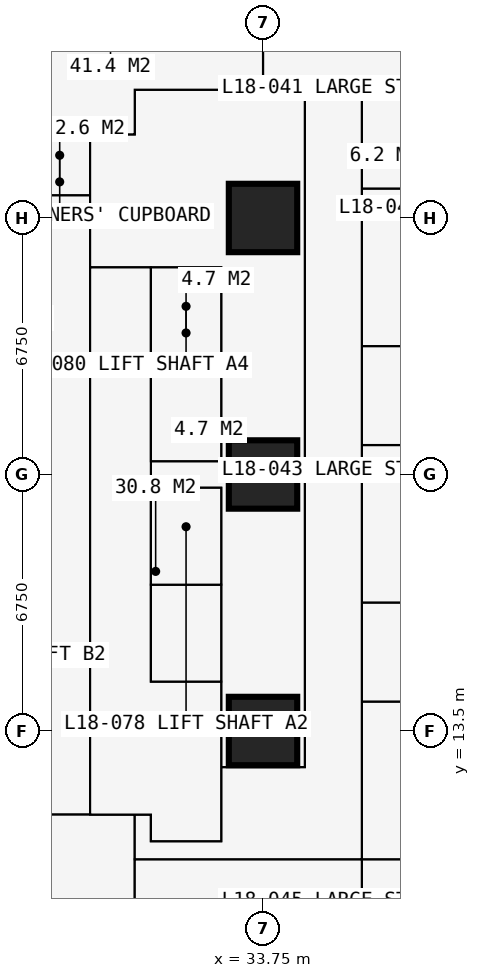
"""IFC4 building model, lengths in metres.
Left out: names, types, materials, properties, quantities, classifications, styles, units other than length and angle.
Written with IfcOpenShell. Run it as: python <this file> out.ifc"""

import sys

from ifc_helpers import new_model, si_unit, direction, frame, frame_2d, origin, origin_2d, place, context, subcontext, project, spatial, rectangle, extrude, element, fill, save


model = new_model("IFC4")
c1 = context("Model", 3, precision=1e-05, world=origin(), true_north=direction((0.0, 1.0)))
c2 = subcontext(c1, "Body", "Model", "MODEL_VIEW")
j1 = project(units=[si_unit("LENGTHUNIT", "METRE"), si_unit("PLANEANGLEUNIT", "RADIAN")], contexts=[c1])
p1 = place(None, origin())
s1 = spatial("IfcSite", under=j1, at=p1, CompositionType="ELEMENT")
p2 = place(p1, origin())
s2 = spatial("IfcBuilding", under=s1, at=p2, CompositionType="ELEMENT")
p3 = place(p2, frame((0.0, 0.0, 68.4)))
s3 = spatial("IfcBuildingStorey", under=s2, at=p3, CompositionType="ELEMENT", Elevation=68.4)
for number, where, z_axis, x_axis in (
    (1, (33.75, 13.5, 0.0), (0.0, 0.0, 1.0), (1.0, 0.0, 0.0)),
    (2, (33.75, 20.25, 0.0), (0.0, 0.0, 1.0), (1.0, 0.0, 0.0)),
    (3, (33.75, 27.0, 0.0), (0.0, 0.0, 1.0), (1.0, 0.0, 0.0)),
):
    element("IfcColumn", number, at=place(p3, frame(where, z_axis=z_axis, x_axis=x_axis)), inside=s3, PredefinedType="COLUMN", context=c2, shape_type="SweptSolid", body=[
        extrude(rectangle(XDim=1.8, YDim=1.8, at=origin_2d()), origin(), (0.0, 0.0, 1.0), 3.6),
    ])
p4 = place(p3, frame((10.125, 11.3, 0.0), z_axis=(0.0, 0.0, 1.0), x_axis=(1.0, 0.0, 0.0)))
e4 = element("IfcWall", 4, at=p4, inside=s3, PredefinedType="PARTITIONING", context=c2, shape_type="SweptSolid", body=[
    extrude(rectangle(XDim=20.675, YDim=0.15, at=frame_2d((10.337, 0.0))), origin(), (0.0, 0.0, 1.0), 3.375),
])
p5 = place(p4, frame((8.375, 0.0, 0.0)))
e5 = element("IfcOpeningElement", 5, at=p5, cuts=e4, PredefinedType="OPENING", context=c2, shape_type="SweptSolid", body=[
    extrude(rectangle(XDim=1.0, YDim=2.2, at=frame_2d((0.5, 1.1))), frame((0.0, 0.085, 0.0), z_axis=(0.0, -1.0, 0.0), x_axis=(1.0, 0.0, 0.0)), (0.0, 0.0, 1.0), 0.17),
])
p6 = place(p4, frame((10.975, 0.0, 0.0)))
e6 = element("IfcOpeningElement", 6, at=p6, cuts=e4, PredefinedType="OPENING", context=c2, shape_type="SweptSolid", body=[
    extrude(rectangle(XDim=1.0, YDim=2.2, at=frame_2d((0.5, 1.1))), frame((0.0, 0.085, 0.0), z_axis=(0.0, -1.0, 0.0), x_axis=(1.0, 0.0, 0.0)), (0.0, 0.0, 1.0), 0.17),
])
p7 = place(p4, frame((3.925, 0.0, 0.0)))
e7 = element("IfcOpeningElement", 7, at=p7, cuts=e4, PredefinedType="OPENING", context=c2, shape_type="SweptSolid", body=[
    extrude(rectangle(XDim=0.95, YDim=2.2, at=frame_2d((0.475, 1.1))), frame((0.0, 0.085, 0.0), z_axis=(0.0, -1.0, 0.0), x_axis=(1.0, 0.0, 0.0)), (0.0, 0.0, 1.0), 0.17),
])
p8 = place(p3, frame((11.3, 29.2, 0.0), z_axis=(0.0, 0.0, 1.0), x_axis=(1.0, 0.0, 0.0)))
e8 = element("IfcWall", 8, at=p8, inside=s3, PredefinedType="PARTITIONING", context=c2, shape_type="SweptSolid", body=[
    extrude(rectangle(XDim=19.075, YDim=0.15, at=frame_2d((9.538, 0.0))), origin(), (0.0, 0.0, 1.0), 3.375),
])
p9 = place(p8, frame((12.875, 0.0, 0.0)))
e9 = element("IfcOpeningElement", 9, at=p9, cuts=e8, PredefinedType="OPENING", context=c2, shape_type="SweptSolid", body=[
    extrude(rectangle(XDim=1.0, YDim=2.2, at=frame_2d((0.5, 1.1))), frame((0.0, 0.085, 0.0), z_axis=(0.0, -1.0, 0.0), x_axis=(1.0, 0.0, 0.0)), (0.0, 0.0, 1.0), 0.17),
])
p10 = place(p8, frame((10.438, 0.0, 0.0)))
e10 = element("IfcOpeningElement", 10, at=p10, cuts=e8, PredefinedType="OPENING", context=c2, shape_type="SweptSolid", body=[
    extrude(rectangle(XDim=1.0, YDim=2.2, at=frame_2d((0.5, 1.1))), frame((0.0, 0.085, 0.0), z_axis=(0.0, -1.0, 0.0), x_axis=(1.0, 0.0, 0.0)), (0.0, 0.0, 1.0), 0.17),
])
p11 = place(p8, frame((14.875, 0.0, 0.0)))
e11 = element("IfcOpeningElement", 11, at=p11, cuts=e8, PredefinedType="OPENING", context=c2, shape_type="SweptSolid", body=[
    extrude(rectangle(XDim=0.95, YDim=2.2, at=frame_2d((0.475, 1.1))), frame((0.0, 0.085, 0.0), z_axis=(0.0, -1.0, 0.0), x_axis=(1.0, 0.0, 0.0)), (0.0, 0.0, 1.0), 0.17),
])
p12 = place(p3, frame((27.6, 27.6, 0.0), z_axis=(0.0, 0.0, 1.0), x_axis=(1.0, 0.0, 0.0)))
e12 = element("IfcWall", 12, at=p12, inside=s3, PredefinedType="PARTITIONING", context=c2, shape_type="SweptSolid", body=[
    extrude(rectangle(XDim=1.6, YDim=0.15, at=frame_2d((0.8, 0.0))), origin(), (0.0, 0.0, 1.0), 2.877),
])
p13 = place(p3, frame((29.2, 11.3, 0.0), z_axis=(0.0, 0.0, 1.0), x_axis=(0.0, 1.0, 0.0)))
e13 = element("IfcWall", 13, at=p13, inside=s3, PredefinedType="PARTITIONING", context=c2, shape_type="SweptSolid", body=[
    extrude(rectangle(XDim=17.9, YDim=0.2, at=frame_2d((8.95, 0.0))), origin(), (0.0, 0.0, 1.0), 3.375),
])
p14 = place(p13, frame((8.35, 0.0, 0.0)))
e14 = element("IfcOpeningElement", 14, at=p14, cuts=e13, PredefinedType="OPENING", context=c2, shape_type="SweptSolid", body=[
    extrude(rectangle(XDim=1.2, YDim=2.2, at=frame_2d((0.6, 1.1))), frame((0.0, 0.11, 0.0), z_axis=(0.0, -1.0, 0.0), x_axis=(1.0, 0.0, 0.0)), (0.0, 0.0, 1.0), 0.22),
])
p15 = place(p3, frame((29.2, 25.7, 0.0), z_axis=(0.0, 0.0, 1.0), x_axis=(1.0, 0.0, 0.0)))
e15 = element("IfcWall", 15, at=p15, inside=s3, PredefinedType="SHEAR", context=c2, shape_type="SweptSolid", body=[
    extrude(rectangle(XDim=3.45, YDim=0.1, at=frame_2d((1.725, 0.0))), origin(), (0.0, 0.0, 1.0), 3.375),
])
p16 = place(p3, frame((30.375, -0.734, 0.0), z_axis=(0.0, 0.0, 1.0), x_axis=(0.0, 1.0, 0.0)))
e16 = element("IfcWall", 16, at=p16, inside=s3, PredefinedType="PARTITIONING", context=c2, shape_type="SweptSolid", body=[
    extrude(rectangle(XDim=12.034, YDim=0.15, at=frame_2d((6.017, 0.0))), origin(), (0.0, 0.0, 1.0), 3.375),
])
p17 = place(p3, frame((30.375, 10.125, 0.0), z_axis=(0.0, 0.0, 1.0), x_axis=(1.0, 0.0, 0.0)))
e17 = element("IfcWall", 17, at=p17, inside=s3, PredefinedType="PARTITIONING", context=c2, shape_type="SweptSolid", body=[
    extrude(rectangle(XDim=10.859, YDim=0.15, at=frame_2d((5.429, 0.0))), origin(), (0.0, 0.0, 1.0), 3.375),
])
p18 = place(p17, frame((2.5, 0.0, 0.0)))
e18 = element("IfcOpeningElement", 18, at=p18, cuts=e17, PredefinedType="OPENING", context=c2, shape_type="SweptSolid", body=[
    extrude(rectangle(XDim=1.0, YDim=2.2, at=frame_2d((0.5, 1.1))), frame((0.0, 0.085, 0.0), z_axis=(0.0, -1.0, 0.0), x_axis=(1.0, 0.0, 0.0)), (0.0, 0.0, 1.0), 0.17),
])
p19 = place(p3, frame((30.375, 29.2, 0.0), z_axis=(0.0, 0.0, 1.0), x_axis=(0.0, 1.0, 0.0)))
e19 = element("IfcWall", 19, at=p19, inside=s3, PredefinedType="PARTITIONING", context=c2, shape_type="SweptSolid", body=[
    extrude(rectangle(XDim=1.175, YDim=0.15, at=frame_2d((0.587, 0.0))), origin(), (0.0, 0.0, 1.0), 3.375),
])
p20 = place(p3, frame((30.375, 30.375, 0.0), z_axis=(0.0, 0.0, 1.0), x_axis=(1.0, 0.0, 0.0)))
e20 = element("IfcWall", 20, at=p20, inside=s3, PredefinedType="PARTITIONING", context=c2, shape_type="SweptSolid", body=[
    extrude(rectangle(XDim=10.859, YDim=0.15, at=frame_2d((5.429, 0.0))), origin(), (0.0, 0.0, 1.0), 3.375),
])
p21 = place(p3, frame((30.8, 10.6, 0.0), z_axis=(0.0, 0.0, 1.0), x_axis=(0.0, 1.0, 0.0)))
e21 = element("IfcWall", 21, at=p21, inside=s3, PredefinedType="PARTITIONING", context=c2, shape_type="SweptSolid", body=[
    extrude(rectangle(XDim=0.7, YDim=0.15, at=frame_2d((0.35, 0.0))), origin(), (0.0, 0.0, 1.0), 3.375),
])
p22 = place(p3, frame((30.8, 10.6, 0.0), z_axis=(0.0, 0.0, 1.0), x_axis=(1.0, 0.0, 0.0)))
e22 = element("IfcWall", 22, at=p22, inside=s3, PredefinedType="PARTITIONING", context=c2, shape_type="SweptSolid", body=[
    extrude(rectangle(XDim=1.85, YDim=0.15, at=frame_2d((0.925, 0.0))), origin(), (0.0, 0.0, 1.0), 3.375),
])
p23 = place(p3, frame((30.8, 14.8, 0.0), z_axis=(0.0, 0.0, 1.0), x_axis=(0.0, 1.0, 0.0)))
e23 = element("IfcWall", 23, at=p23, inside=s3, PredefinedType="PARTITIONING", context=c2, shape_type="SweptSolid", body=[
    extrude(rectangle(XDim=10.9, YDim=0.15, at=frame_2d((5.45, 0.0))), origin(), (0.0, 0.0, 1.0), 3.375),
])
p24 = place(p23, frame((0.75, 0.0, 0.0)))
e24 = element("IfcOpeningElement", 24, at=p24, cuts=e23, PredefinedType="OPENING", context=c2, shape_type="SweptSolid", body=[
    extrude(rectangle(XDim=1.1, YDim=2.2, at=frame_2d((0.55, 1.1))), frame((0.0, 0.085, 0.0), z_axis=(0.0, -1.0, 0.0), x_axis=(1.0, 0.0, 0.0)), (0.0, 0.0, 1.0), 0.17),
])
p25 = place(p23, frame((3.25, 0.0, 0.0)))
e25 = element("IfcOpeningElement", 25, at=p25, cuts=e23, PredefinedType="OPENING", context=c2, shape_type="SweptSolid", body=[
    extrude(rectangle(XDim=1.1, YDim=2.2, at=frame_2d((0.55, 1.1))), frame((0.0, 0.085, 0.0), z_axis=(0.0, -1.0, 0.0), x_axis=(1.0, 0.0, 0.0)), (0.0, 0.0, 1.0), 0.17),
])
p26 = place(p23, frame((6.5, 0.0, 0.0)))
e26 = element("IfcOpeningElement", 26, at=p26, cuts=e23, PredefinedType="OPENING", context=c2, shape_type="SweptSolid", body=[
    extrude(rectangle(XDim=1.1, YDim=2.2, at=frame_2d((0.55, 1.1))), frame((0.0, 0.085, 0.0), z_axis=(0.0, -1.0, 0.0), x_axis=(1.0, 0.0, 0.0)), (0.0, 0.0, 1.0), 0.17),
])
p27 = place(p23, frame((9.05, 0.0, 0.0)))
e27 = element("IfcOpeningElement", 27, at=p27, cuts=e23, PredefinedType="OPENING", context=c2, shape_type="SweptSolid", body=[
    extrude(rectangle(XDim=1.1, YDim=2.2, at=frame_2d((0.55, 1.1))), frame((0.0, 0.085, 0.0), z_axis=(0.0, -1.0, 0.0), x_axis=(1.0, 0.0, 0.0)), (0.0, 0.0, 1.0), 0.17),
])
for number, where, z_axis, x_axis in (
    (28, (30.8, 14.8, 0.0), (0.0, 0.0, 1.0), (1.0, 0.0, 0.0)),
    (29, (30.8, 17.35, 0.0), (0.0, 0.0, 1.0), (1.0, 0.0, 0.0)),
    (30, (30.8, 19.9, 0.0), (0.0, 0.0, 1.0), (1.0, 0.0, 0.0)),
    (31, (30.8, 20.6, 0.0), (0.0, 0.0, 1.0), (1.0, 0.0, 0.0)),
    (32, (30.8, 23.15, 0.0), (0.0, 0.0, 1.0), (1.0, 0.0, 0.0)),
):
    element("IfcWall", number, at=place(p3, frame(where, z_axis=z_axis, x_axis=x_axis)), inside=s3, PredefinedType="SHEAR", context=c2, shape_type="SweptSolid", body=[
        extrude(rectangle(XDim=1.85, YDim=0.1, at=frame_2d((0.925, 0.0))), origin(), (0.0, 0.0, 1.0), 3.375),
    ])
p28 = place(p3, frame((32.65, 10.6, 0.0), z_axis=(0.0, 0.0, 1.0), x_axis=(0.0, 1.0, 0.0)))
e33 = element("IfcWall", 33, at=p28, inside=s3, PredefinedType="SHEAR", context=c2, shape_type="SweptSolid", body=[
    extrude(rectangle(XDim=9.3, YDim=0.1, at=frame_2d((4.65, 0.0))), origin(), (0.0, 0.0, 1.0), 3.375),
])
p29 = place(p28, frame((0.5, 0.0, 0.0)))
e34 = element("IfcOpeningElement", 34, at=p29, cuts=e33, PredefinedType="OPENING", context=c2, shape_type="SweptSolid", body=[
    extrude(rectangle(XDim=1.0, YDim=2.2, at=frame_2d((0.5, 1.1))), frame((0.0, 0.06, 0.0), z_axis=(0.0, -1.0, 0.0), x_axis=(1.0, 0.0, 0.0)), (0.0, 0.0, 1.0), 0.12),
])
p30 = place(p3, frame((32.65, 12.55, 0.0), z_axis=(0.0, 0.0, 1.0), x_axis=(1.0, 0.0, 0.0)))
e35 = element("IfcWall", 35, at=p30, inside=s3, PredefinedType="PARTITIONING", context=c2, shape_type="SweptSolid", body=[
    extrude(rectangle(XDim=2.2, YDim=0.15, at=frame_2d((1.1, 0.0))), origin(), (0.0, 0.0, 1.0), 3.375),
])
p31 = place(p3, frame((32.65, 20.6, 0.0), z_axis=(0.0, 0.0, 1.0), x_axis=(0.0, 1.0, 0.0)))
e36 = element("IfcWall", 36, at=p31, inside=s3, PredefinedType="PARTITIONING", context=c2, shape_type="SweptSolid", body=[
    extrude(rectangle(XDim=5.1, YDim=0.15, at=frame_2d((2.55, 0.0))), origin(), (0.0, 0.0, 1.0), 3.375),
])
p32 = place(p3, frame((33.75, 30.375, 0.0), z_axis=(0.0, 0.0, 1.0), x_axis=(0.0, 1.0, 0.0)))
e37 = element("IfcWall", 37, at=p32, inside=s3, PredefinedType="PARTITIONING", context=c2, shape_type="SweptSolid", body=[
    extrude(rectangle(XDim=5.975, YDim=0.15, at=frame_2d((2.988, 0.0))), origin(), (0.0, 0.0, 1.0), 2.877),
])
p33 = place(p3, frame((34.85, 12.55, 0.0), z_axis=(0.0, 0.0, 1.0), x_axis=(0.0, 1.0, 0.0)))
e38 = element("IfcWall", 38, at=p33, inside=s3, PredefinedType="PARTITIONING", context=c2, shape_type="SweptSolid", body=[
    extrude(rectangle(XDim=17.825, YDim=0.15, at=frame_2d((8.913, 0.0))), origin(), (0.0, 0.0, 1.0), 3.375),
])
p34 = place(p33, frame((8.6, 0.0, 0.0)))
e39 = element("IfcOpeningElement", 39, at=p34, cuts=e38, PredefinedType="OPENING", context=c2, shape_type="SweptSolid", body=[
    extrude(rectangle(XDim=0.95, YDim=2.2, at=frame_2d((0.475, 1.1))), frame((0.0, 0.085, 0.0), z_axis=(0.0, -1.0, 0.0), x_axis=(1.0, 0.0, 0.0)), (0.0, 0.0, 1.0), 0.17),
])
p35 = place(p3, frame((36.35, 6.75, 0.0), z_axis=(0.0, 0.0, 1.0), x_axis=(0.0, 1.0, 0.0)))
e40 = element("IfcWall", 40, at=p35, inside=s3, PredefinedType="PARTITIONING", context=c2, shape_type="SweptSolid", body=[
    extrude(rectangle(XDim=23.625, YDim=0.15, at=frame_2d((11.812, 0.0))), origin(), (0.0, 0.0, 1.0), 3.375),
])
p36 = place(p35, frame((0.2, 0.0, 0.0)))
e41 = element("IfcOpeningElement", 41, at=p36, cuts=e40, PredefinedType="OPENING", context=c2, shape_type="SweptSolid", body=[
    extrude(rectangle(XDim=0.95, YDim=2.2, at=frame_2d((0.475, 1.1))), frame((0.0, 0.085, 0.0), z_axis=(0.0, -1.0, 0.0), x_axis=(1.0, 0.0, 0.0)), (0.0, 0.0, 1.0), 0.17),
])
p37 = place(p35, frame((18.475, 0.0, 0.0)))
e42 = element("IfcOpeningElement", 42, at=p37, cuts=e40, PredefinedType="OPENING", context=c2, shape_type="SweptSolid", body=[
    extrude(rectangle(XDim=0.95, YDim=2.2, at=frame_2d((0.475, 1.1))), frame((0.0, 0.085, 0.0), z_axis=(0.0, -1.0, 0.0), x_axis=(1.0, 0.0, 0.0)), (0.0, 0.0, 1.0), 0.17),
])
p38 = place(p35, frame((11.725, 0.0, 0.0)))
e43 = element("IfcOpeningElement", 43, at=p38, cuts=e40, PredefinedType="OPENING", context=c2, shape_type="SweptSolid", body=[
    extrude(rectangle(XDim=0.95, YDim=2.2, at=frame_2d((0.475, 1.1))), frame((0.0, 0.085, 0.0), z_axis=(0.0, -1.0, 0.0), x_axis=(1.0, 0.0, 0.0)), (0.0, 0.0, 1.0), 0.17),
])
p39 = place(p35, frame((4.975, 0.0, 0.0)))
e44 = element("IfcOpeningElement", 44, at=p39, cuts=e40, PredefinedType="OPENING", context=c2, shape_type="SweptSolid", body=[
    extrude(rectangle(XDim=0.95, YDim=2.2, at=frame_2d((0.475, 1.1))), frame((0.0, 0.085, 0.0), z_axis=(0.0, -1.0, 0.0), x_axis=(1.0, 0.0, 0.0)), (0.0, 0.0, 1.0), 0.17),
])
p40 = place(p3, frame((36.35, 14.275, 0.0), z_axis=(0.0, 0.0, 1.0), x_axis=(1.0, 0.0, 0.0)))
e45 = element("IfcWall", 45, at=p40, inside=s3, PredefinedType="PARTITIONING", context=c2, shape_type="SweptSolid", body=[
    extrude(rectangle(XDim=2.4, YDim=0.1, at=frame_2d((1.2, 0.0))), origin(), (0.0, 0.0, 1.0), 3.375),
])
p41 = place(p3, frame((36.35, 16.875, 0.0), z_axis=(0.0, 0.0, 1.0), x_axis=(1.0, 0.0, 0.0)))
e46 = element("IfcWall", 46, at=p41, inside=s3, PredefinedType="PARTITIONING", context=c2, shape_type="SweptSolid", body=[
    extrude(rectangle(XDim=4.884, YDim=0.175, at=frame_2d((2.442, 0.0))), origin(), (0.0, 0.0, 1.0), 3.375),
])
p42 = place(p41, frame((0.75, 0.0, 0.0)))
e47 = element("IfcOpeningElement", 47, at=p42, cuts=e46, PredefinedType="OPENING", context=c2, shape_type="SweptSolid", body=[
    extrude(rectangle(XDim=0.9, YDim=2.2, at=frame_2d((0.45, 1.1))), frame((0.0, 0.097, 0.0), z_axis=(0.0, -1.0, 0.0), x_axis=(1.0, 0.0, 0.0)), (0.0, 0.0, 1.0), 0.195),
])
p43 = place(p3, frame((36.35, 21.025, 0.0), z_axis=(0.0, 0.0, 1.0), x_axis=(1.0, 0.0, 0.0)))
e48 = element("IfcWall", 48, at=p43, inside=s3, PredefinedType="PARTITIONING", context=c2, shape_type="SweptSolid", body=[
    extrude(rectangle(XDim=2.4, YDim=0.1, at=frame_2d((1.2, 0.0))), origin(), (0.0, 0.0, 1.0), 3.375),
])
p44 = place(p3, frame((36.35, 23.625, 0.0), z_axis=(0.0, 0.0, 1.0), x_axis=(1.0, 0.0, 0.0)))
e49 = element("IfcWall", 49, at=p44, inside=s3, PredefinedType="PARTITIONING", context=c2, shape_type="SweptSolid", body=[
    extrude(rectangle(XDim=4.884, YDim=0.175, at=frame_2d((2.442, 0.0))), origin(), (0.0, 0.0, 1.0), 3.375),
])
p45 = place(p44, frame((0.75, 0.0, 0.0)))
e50 = element("IfcOpeningElement", 50, at=p45, cuts=e49, PredefinedType="OPENING", context=c2, shape_type="SweptSolid", body=[
    extrude(rectangle(XDim=0.9, YDim=2.2, at=frame_2d((0.45, 1.1))), frame((0.0, 0.097, 0.0), z_axis=(0.0, -1.0, 0.0), x_axis=(1.0, 0.0, 0.0)), (0.0, 0.0, 1.0), 0.195),
])
p46 = place(p3, frame((36.35, 27.775, 0.0), z_axis=(0.0, 0.0, 1.0), x_axis=(1.0, 0.0, 0.0)))
e51 = element("IfcWall", 51, at=p46, inside=s3, PredefinedType="PARTITIONING", context=c2, shape_type="SweptSolid", body=[
    extrude(rectangle(XDim=2.4, YDim=0.1, at=frame_2d((1.2, 0.0))), origin(), (0.0, 0.0, 1.0), 3.375),
])
p47 = place(p18, origin())
e52 = element("IfcDoor", 52, at=p47, inside=s3, OperationType="SINGLE_SWING_LEFT", PredefinedType="DOOR", context=c2, shape_type="SweptSolid", body=[
    extrude(rectangle(XDim=1.0, YDim=2.2, at=frame_2d((0.5, 1.1))), frame((0.0, 0.025, 0.0), z_axis=(0.0, -1.0, 0.0), x_axis=(1.0, 0.0, 0.0)), (0.0, 0.0, 1.0), 0.05),
])
fill(e18, e52)
p48 = place(p37, origin())
e53 = element("IfcDoor", 53, at=p48, inside=s3, OperationType="SINGLE_SWING_LEFT", PredefinedType="DOOR", context=c2, shape_type="SweptSolid", body=[
    extrude(rectangle(XDim=0.95, YDim=2.2, at=frame_2d((0.475, 1.1))), frame((0.0, 0.025, 0.0), z_axis=(0.0, -1.0, 0.0), x_axis=(1.0, 0.0, 0.0)), (0.0, 0.0, 1.0), 0.05),
])
fill(e42, e53)
p49 = place(p38, origin())
e54 = element("IfcDoor", 54, at=p49, inside=s3, OperationType="SINGLE_SWING_LEFT", PredefinedType="DOOR", context=c2, shape_type="SweptSolid", body=[
    extrude(rectangle(XDim=0.95, YDim=2.2, at=frame_2d((0.475, 1.1))), frame((0.0, 0.025, 0.0), z_axis=(0.0, -1.0, 0.0), x_axis=(1.0, 0.0, 0.0)), (0.0, 0.0, 1.0), 0.05),
])
fill(e43, e54)
p50 = place(p45, origin())
e55 = element("IfcDoor", 55, at=p50, inside=s3, OperationType="SINGLE_SWING_RIGHT", PredefinedType="DOOR", context=c2, shape_type="SweptSolid", body=[
    extrude(rectangle(XDim=0.9, YDim=2.2, at=frame_2d((0.45, 1.1))), frame((0.0, 0.025, 0.0), z_axis=(0.0, -1.0, 0.0), x_axis=(1.0, 0.0, 0.0)), (0.0, 0.0, 1.0), 0.05),
])
fill(e50, e55)
p51 = place(p39, origin())
e56 = element("IfcDoor", 56, at=p51, inside=s3, OperationType="SINGLE_SWING_LEFT", PredefinedType="DOOR", context=c2, shape_type="SweptSolid", body=[
    extrude(rectangle(XDim=0.95, YDim=2.2, at=frame_2d((0.475, 1.1))), frame((0.0, 0.025, 0.0), z_axis=(0.0, -1.0, 0.0), x_axis=(1.0, 0.0, 0.0)), (0.0, 0.0, 1.0), 0.05),
])
fill(e44, e56)
p52 = place(p42, origin())
e57 = element("IfcDoor", 57, at=p52, inside=s3, OperationType="SINGLE_SWING_RIGHT", PredefinedType="DOOR", context=c2, shape_type="SweptSolid", body=[
    extrude(rectangle(XDim=0.9, YDim=2.2, at=frame_2d((0.45, 1.1))), frame((0.0, 0.025, 0.0), z_axis=(0.0, -1.0, 0.0), x_axis=(1.0, 0.0, 0.0)), (0.0, 0.0, 1.0), 0.05),
])
fill(e47, e57)
p53 = place(p29, origin())
e58 = element("IfcDoor", 58, at=p53, inside=s3, OperationType="SINGLE_SWING_LEFT", PredefinedType="DOOR", context=c2, shape_type="SweptSolid", body=[
    extrude(rectangle(XDim=1.0, YDim=2.2, at=frame_2d((0.5, 1.1))), frame((0.0, 0.025, 0.0), z_axis=(0.0, -1.0, 0.0), x_axis=(1.0, 0.0, 0.0)), (0.0, 0.0, 1.0), 0.05),
])
fill(e34, e58)
p54 = place(p34, origin())
e59 = element("IfcDoor", 59, at=p54, inside=s3, OperationType="SINGLE_SWING_LEFT", PredefinedType="DOOR", context=c2, shape_type="SweptSolid", body=[
    extrude(rectangle(XDim=0.95, YDim=2.2, at=frame_2d((0.475, 1.1))), frame((0.0, 0.025, 0.0), z_axis=(0.0, -1.0, 0.0), x_axis=(1.0, 0.0, 0.0)), (0.0, 0.0, 1.0), 0.05),
])
fill(e39, e59)
p55 = place(p24, origin())
e60 = element("IfcDoor", 60, at=p55, inside=s3, OperationType="DOUBLE_DOOR_SLIDING", PredefinedType="DOOR", context=c2, shape_type="SweptSolid", body=[
    extrude(rectangle(XDim=1.1, YDim=2.2, at=frame_2d((0.55, 1.1))), frame((0.0, 0.025, 0.0), z_axis=(0.0, -1.0, 0.0), x_axis=(1.0, 0.0, 0.0)), (0.0, 0.0, 1.0), 0.05),
])
fill(e24, e60)
p56 = place(p25, origin())
e61 = element("IfcDoor", 61, at=p56, inside=s3, OperationType="DOUBLE_DOOR_SLIDING", PredefinedType="DOOR", context=c2, shape_type="SweptSolid", body=[
    extrude(rectangle(XDim=1.1, YDim=2.2, at=frame_2d((0.55, 1.1))), frame((0.0, 0.025, 0.0), z_axis=(0.0, -1.0, 0.0), x_axis=(1.0, 0.0, 0.0)), (0.0, 0.0, 1.0), 0.05),
])
fill(e25, e61)
p57 = place(p26, origin())
e62 = element("IfcDoor", 62, at=p57, inside=s3, OperationType="DOUBLE_DOOR_SLIDING", PredefinedType="DOOR", context=c2, shape_type="SweptSolid", body=[
    extrude(rectangle(XDim=1.1, YDim=2.2, at=frame_2d((0.55, 1.1))), frame((0.0, 0.025, 0.0), z_axis=(0.0, -1.0, 0.0), x_axis=(1.0, 0.0, 0.0)), (0.0, 0.0, 1.0), 0.05),
])
fill(e26, e62)
p58 = place(p27, origin())
e63 = element("IfcDoor", 63, at=p58, inside=s3, OperationType="DOUBLE_DOOR_SLIDING", PredefinedType="DOOR", context=c2, shape_type="SweptSolid", body=[
    extrude(rectangle(XDim=1.1, YDim=2.2, at=frame_2d((0.55, 1.1))), frame((0.0, 0.025, 0.0), z_axis=(0.0, -1.0, 0.0), x_axis=(1.0, 0.0, 0.0)), (0.0, 0.0, 1.0), 0.05),
])
fill(e27, e63)
p59 = place(p14, origin())
e64 = element("IfcDoor", 64, at=p59, inside=s3, OperationType="DOUBLE_DOOR_SINGLE_SWING", PredefinedType="DOOR", context=c2, shape_type="SweptSolid", body=[
    extrude(rectangle(XDim=1.2, YDim=2.2, at=frame_2d((0.6, 1.1))), frame((0.0, 0.025, 0.0), z_axis=(0.0, -1.0, 0.0), x_axis=(1.0, 0.0, 0.0)), (0.0, 0.0, 1.0), 0.05),
])
fill(e14, e64)
save(model, sys.argv[1])
